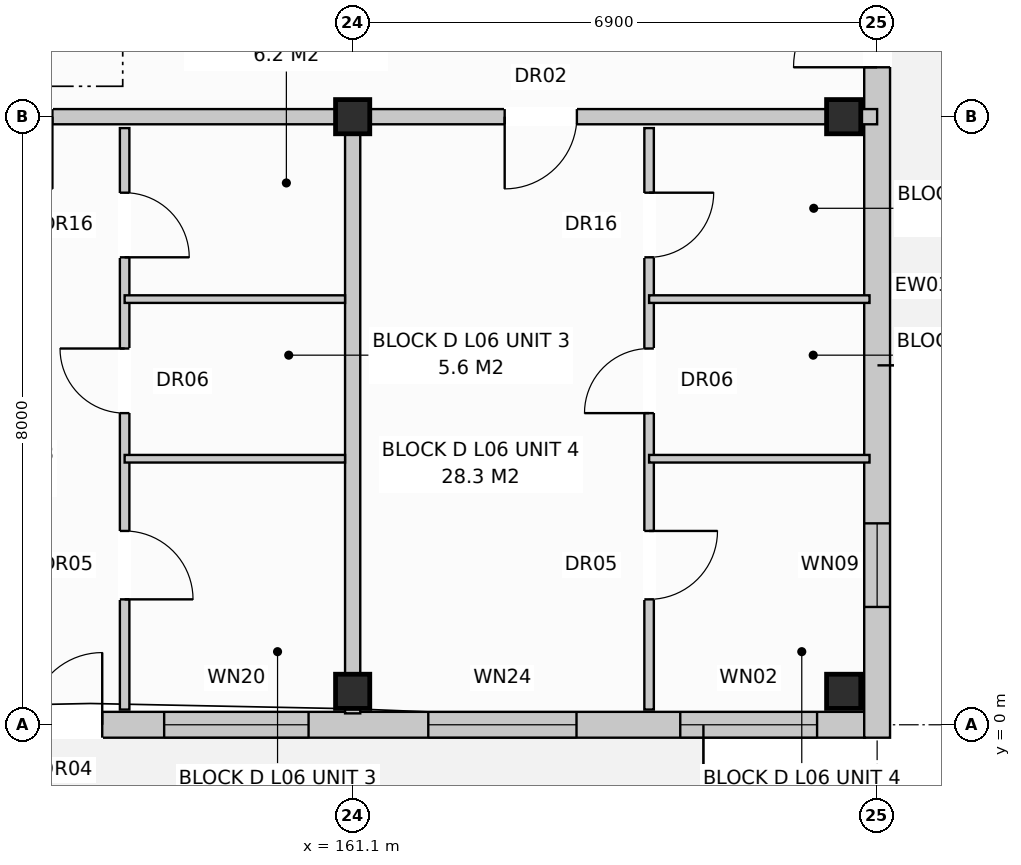
"""IFC4 building model, lengths in metres.
Left out: names, types, materials, properties, quantities, classifications, styles, units other than length and angle.
Written with IfcOpenShell. Run it as: python <this file> out.ifc"""

import sys

from ifc_helpers import new_model, si_unit, direction, frame, frame_2d, origin, origin_with_axes, origin_2d, place, context, subcontext, project, spatial, rectangle, extrude, element, fill, save


model = new_model("IFC4")
c1 = context("Model", 3, precision=1e-05, world=origin(), true_north=direction((0.0, 1.0)))
c2 = subcontext(c1, "Body", "Model", "MODEL_VIEW")
j1 = project(units=[si_unit("LENGTHUNIT", "METRE"), si_unit("PLANEANGLEUNIT", "RADIAN")], contexts=[c1])
p1 = place(None, origin())
s1 = spatial("IfcSite", under=j1, at=p1, CompositionType="ELEMENT")
p2 = place(p1, origin())
s2 = spatial("IfcBuilding", under=s1, at=p2, CompositionType="ELEMENT")
p3 = place(p2, frame((0.0, 0.0, 20.8)))
s3 = spatial("IfcBuildingStorey", under=s2, at=p3, CompositionType="ELEMENT", Elevation=20.8)
for number, where, z_axis, x_axis in (
    (1, (161.1, 0.44, 0.0), (0.0, 0.0, 1.0), (1.0, 0.0, 0.0)),
    (2, (161.1, 8.0, 0.0), (0.0, 0.0, 1.0), (1.0, 0.0, 0.0)),
    (3, (167.56, 0.44, 0.0), (0.0, 0.0, 1.0), (1.0, 0.0, 0.0)),
    (4, (167.56, 8.0, 0.0), (0.0, 0.0, 1.0), (1.0, 0.0, 0.0)),
):
    element("IfcColumn", number, at=place(p3, frame(where, z_axis=z_axis, x_axis=x_axis)), inside=s3, PredefinedType="COLUMN", context=c2, shape_type="SweptSolid", body=[
        extrude(rectangle(XDim=0.45, YDim=0.45, at=origin_2d()), origin(), (0.0, 0.0, 1.0), 3.2),
    ])
p4 = place(p3, frame((126.76, 0.0, 0.0), z_axis=(0.0, 0.0, 1.0), x_axis=(1.0, 0.0, 0.0)))
e5 = element("IfcWall", 5, at=p4, inside=s3, PredefinedType="STANDARD", context=c2, shape_type="SweptSolid", body=[
    extrude(rectangle(XDim=41.08, YDim=0.34, at=frame_2d((20.54, 0.0))), origin(), (0.0, 0.0, 1.0), 2.95),
])
p5 = place(p4, frame((2.795, 0.0, 0.0)))
e6 = element("IfcOpeningElement", 6, at=p5, cuts=e5, PredefinedType="OPENING", context=c2, shape_type="SweptSolid", body=[
    extrude(rectangle(XDim=0.95, YDim=2.1, at=frame_2d((0.475, 1.05))), frame((0.0, 0.182, 0.0), z_axis=(0.0, -1.0, 0.0), x_axis=(1.0, 0.0, 0.0)), (0.0, 0.0, 1.0), 0.364),
])
p6 = place(p4, frame((17.595, 0.0, 0.0)))
e7 = element("IfcOpeningElement", 7, at=p6, cuts=e5, PredefinedType="OPENING", context=c2, shape_type="SweptSolid", body=[
    extrude(rectangle(XDim=0.95, YDim=2.1, at=frame_2d((0.475, 1.05))), frame((0.0, 0.182, 0.0), z_axis=(0.0, -1.0, 0.0), x_axis=(1.0, 0.0, 0.0)), (0.0, 0.0, 1.0), 0.364),
])
p7 = place(p4, frame((30.095, 0.0, 0.0)))
e8 = element("IfcOpeningElement", 8, at=p7, cuts=e5, PredefinedType="OPENING", context=c2, shape_type="SweptSolid", body=[
    extrude(rectangle(XDim=0.95, YDim=2.1, at=frame_2d((0.475, 1.05))), frame((0.0, 0.182, 0.0), z_axis=(0.0, -1.0, 0.0), x_axis=(1.0, 0.0, 0.0)), (0.0, 0.0, 1.0), 0.364),
])
p8 = place(p4, frame((0.63, 0.0, 0.8)))
e9 = element("IfcOpeningElement", 9, at=p8, cuts=e5, PredefinedType="OPENING", context=c2, shape_type="SweptSolid", body=[
    extrude(rectangle(XDim=1.8, YDim=1.7, at=frame_2d((0.9, 0.85))), frame((0.0, 0.182, 0.0), z_axis=(0.0, -1.0, 0.0), x_axis=(1.0, 0.0, 0.0)), (0.0, 0.0, 1.0), 0.364),
])
p9 = place(p4, frame((4.36, 0.0, 0.72)))
e10 = element("IfcOpeningElement", 10, at=p9, cuts=e5, PredefinedType="OPENING", context=c2, shape_type="SweptSolid", body=[
    extrude(rectangle(XDim=1.9, YDim=1.85, at=frame_2d((0.95, 0.925))), frame((0.0, 0.182, 0.0), z_axis=(0.0, -1.0, 0.0), x_axis=(1.0, 0.0, 0.0)), (0.0, 0.0, 1.0), 0.364),
])
p10 = place(p4, frame((10.46, 0.0, 0.72)))
e11 = element("IfcOpeningElement", 11, at=p10, cuts=e5, PredefinedType="OPENING", context=c2, shape_type="SweptSolid", body=[
    extrude(rectangle(XDim=1.1, YDim=1.5, at=frame_2d((0.55, 0.75))), frame((0.0, 0.182, 0.0), z_axis=(0.0, -1.0, 0.0), x_axis=(1.0, 0.0, 0.0)), (0.0, 0.0, 1.0), 0.364),
])
p11 = place(p4, frame((15.76, 0.0, 0.72)))
e12 = element("IfcOpeningElement", 12, at=p11, cuts=e5, PredefinedType="OPENING", context=c2, shape_type="SweptSolid", body=[
    extrude(rectangle(XDim=1.1, YDim=1.5, at=frame_2d((0.55, 0.75))), frame((0.0, 0.182, 0.0), z_axis=(0.0, -1.0, 0.0), x_axis=(1.0, 0.0, 0.0)), (0.0, 0.0, 1.0), 0.364),
])
p12 = place(p4, frame((21.042, 0.0, 0.72)))
e13 = element("IfcOpeningElement", 13, at=p12, cuts=e5, PredefinedType="OPENING", context=c2, shape_type="SweptSolid", body=[
    extrude(rectangle(XDim=1.9, YDim=1.85, at=frame_2d((0.95, 0.925))), frame((0.0, 0.182, 0.0), z_axis=(0.0, -1.0, 0.0), x_axis=(1.0, 0.0, 0.0)), (0.0, 0.0, 1.0), 0.364),
])
p13 = place(p4, frame((24.66, 0.0, 0.72)))
e14 = element("IfcOpeningElement", 14, at=p13, cuts=e5, PredefinedType="OPENING", context=c2, shape_type="SweptSolid", body=[
    extrude(rectangle(XDim=1.1, YDim=1.5, at=frame_2d((0.55, 0.75))), frame((0.0, 0.182, 0.0), z_axis=(0.0, -1.0, 0.0), x_axis=(1.0, 0.0, 0.0)), (0.0, 0.0, 1.0), 0.364),
])
p14 = place(p4, frame((28.21, 0.0, 0.85)))
e15 = element("IfcOpeningElement", 15, at=p14, cuts=e5, PredefinedType="OPENING", context=c2, shape_type="SweptSolid", body=[
    extrude(rectangle(XDim=1.5, YDim=1.65, at=frame_2d((0.75, 0.825))), frame((0.0, 0.182, 0.0), z_axis=(0.0, -1.0, 0.0), x_axis=(1.0, 0.0, 0.0)), (0.0, 0.0, 1.0), 0.364),
])
p15 = place(p4, frame((31.86, 0.0, 0.72)))
e16 = element("IfcOpeningElement", 16, at=p15, cuts=e5, PredefinedType="OPENING", context=c2, shape_type="SweptSolid", body=[
    extrude(rectangle(XDim=1.9, YDim=1.85, at=frame_2d((0.95, 0.925))), frame((0.0, 0.182, 0.0), z_axis=(0.0, -1.0, 0.0), x_axis=(1.0, 0.0, 0.0)), (0.0, 0.0, 1.0), 0.364),
])
p16 = place(p4, frame((35.335, 0.0, 0.8)))
e17 = element("IfcOpeningElement", 17, at=p16, cuts=e5, PredefinedType="OPENING", context=c2, shape_type="SweptSolid", body=[
    extrude(rectangle(XDim=1.95, YDim=1.65, at=frame_2d((0.975, 0.825))), frame((0.0, 0.182, 0.0), z_axis=(0.0, -1.0, 0.0), x_axis=(1.0, 0.0, 0.0)), (0.0, 0.0, 1.0), 0.364),
])
p17 = place(p4, frame((38.65, 0.0, 0.8)))
e18 = element("IfcOpeningElement", 18, at=p17, cuts=e5, PredefinedType="OPENING", context=c2, shape_type="SweptSolid", body=[
    extrude(rectangle(XDim=1.8, YDim=1.7, at=frame_2d((0.9, 0.85))), frame((0.0, 0.182, 0.0), z_axis=(0.0, -1.0, 0.0), x_axis=(1.0, 0.0, 0.0)), (0.0, 0.0, 1.0), 0.364),
])
p18 = place(p3, frame((168.0, -0.17, 0.0), z_axis=(0.0, 0.0, 1.0), x_axis=(0.0, 1.0, 0.0)))
e19 = element("IfcWall", 19, at=p18, inside=s3, PredefinedType="STANDARD", context=c2, shape_type="SweptSolid", body=[
    extrude(rectangle(XDim=18.74, YDim=0.34, at=frame_2d((9.37, 0.0))), origin(), (0.0, 0.0, 1.0), 2.95),
])
p19 = place(p18, frame((8.82, 0.0, 0.0)))
e20 = element("IfcOpeningElement", 20, at=p19, cuts=e19, PredefinedType="OPENING", context=c2, shape_type="SweptSolid", body=[
    extrude(rectangle(XDim=1.1, YDim=2.1, at=frame_2d((0.55, 1.05))), frame((0.0, 0.182, 0.0), z_axis=(0.0, -1.0, 0.0), x_axis=(1.0, 0.0, 0.0)), (0.0, 0.0, 1.0), 0.364),
])
p20 = place(p18, frame((1.72, 0.0, 0.72)))
e21 = element("IfcOpeningElement", 21, at=p20, cuts=e19, PredefinedType="OPENING", context=c2, shape_type="SweptSolid", body=[
    extrude(rectangle(XDim=1.1, YDim=1.5, at=frame_2d((0.55, 0.75))), frame((0.0, 0.182, 0.0), z_axis=(0.0, -1.0, 0.0), x_axis=(1.0, 0.0, 0.0)), (0.0, 0.0, 1.0), 0.364),
])
p21 = place(p18, frame((15.92, 0.0, 0.72)))
e22 = element("IfcOpeningElement", 22, at=p21, cuts=e19, PredefinedType="OPENING", context=c2, shape_type="SweptSolid", body=[
    extrude(rectangle(XDim=1.1, YDim=1.5, at=frame_2d((0.55, 0.75))), frame((0.0, 0.182, 0.0), z_axis=(0.0, -1.0, 0.0), x_axis=(1.0, 0.0, 0.0)), (0.0, 0.0, 1.0), 0.364),
])
p22 = place(p3, frame((161.1, 7.85, 0.0), z_axis=(0.0, 0.0, 1.0), x_axis=(0.0, -1.0, 0.0)))
e23 = element("IfcWall", 23, at=p22, inside=s3, PredefinedType="PARTITIONING", context=c2, shape_type="SweptSolid", body=[
    extrude(rectangle(XDim=7.7, YDim=0.2, at=frame_2d((3.85, 0.0))), origin(), (0.0, 0.0, 1.0), 2.39),
])
p23 = place(p3, frame((154.2, 8.0, 0.0), z_axis=(0.0, 0.0, 1.0), x_axis=(1.0, 0.0, 0.0)))
e24 = element("IfcWall", 24, at=p23, inside=s3, PredefinedType="PARTITIONING", context=c2, shape_type="SweptSolid", body=[
    extrude(rectangle(XDim=6.9, YDim=0.2, at=frame_2d((3.45, 0.0))), origin(), (0.0, 0.0, 1.0), 2.39),
])
p24 = place(p23, frame((2.0, 0.0, 0.0)))
e25 = element("IfcOpeningElement", 25, at=p24, cuts=e24, PredefinedType="OPENING", context=c2, shape_type="SweptSolid", body=[
    extrude(rectangle(XDim=0.95, YDim=2.15, at=frame_2d((0.475, 1.075))), frame((0.0, 0.112, 0.0), z_axis=(0.0, -1.0, 0.0), x_axis=(1.0, 0.0, 0.0)), (0.0, 0.0, 1.0), 0.224),
])
p25 = place(p3, frame((158.1, 7.85, 0.0), z_axis=(0.0, 0.0, 1.0), x_axis=(0.0, -1.0, 0.0)))
e26 = element("IfcWall", 26, at=p25, inside=s3, PredefinedType="PARTITIONING", context=c2, shape_type="SweptSolid", body=[
    extrude(rectangle(XDim=7.65, YDim=0.125, at=frame_2d((3.825, 0.0))), origin(), (0.0, 0.0, 1.0), 2.95),
])
p26 = place(p25, frame((0.85, 0.0, 0.0)))
e27 = element("IfcOpeningElement", 27, at=p26, cuts=e26, PredefinedType="OPENING", context=c2, shape_type="SweptSolid", body=[
    extrude(rectangle(XDim=0.85, YDim=2.1, at=frame_2d((0.425, 1.05))), frame((0.0, 0.074, 0.0), z_axis=(0.0, -1.0, 0.0), x_axis=(1.0, 0.0, 0.0)), (0.0, 0.0, 1.0), 0.149),
])
p27 = place(p25, frame((2.9, 0.0, 0.0)))
e28 = element("IfcOpeningElement", 28, at=p27, cuts=e26, PredefinedType="OPENING", context=c2, shape_type="SweptSolid", body=[
    extrude(rectangle(XDim=0.85, YDim=2.05, at=frame_2d((0.425, 1.025))), frame((0.0, 0.074, 0.0), z_axis=(0.0, -1.0, 0.0), x_axis=(1.0, 0.0, 0.0)), (0.0, 0.0, 1.0), 0.149),
])
p28 = place(p25, frame((5.3, 0.0, 0.0)))
e29 = element("IfcOpeningElement", 29, at=p28, cuts=e26, PredefinedType="OPENING", context=c2, shape_type="SweptSolid", body=[
    extrude(rectangle(XDim=0.9, YDim=2.1, at=frame_2d((0.45, 1.05))), frame((0.0, 0.074, 0.0), z_axis=(0.0, -1.0, 0.0), x_axis=(1.0, 0.0, 0.0)), (0.0, 0.0, 1.0), 0.149),
])
for number, where, z_axis, x_axis in (
    (30, (158.1, 5.6, 0.0), (0.0, 0.0, 1.0), (1.0, 0.0, 0.0)),
    (31, (158.1, 3.5, 0.0), (0.0, 0.0, 1.0), (1.0, 0.0, 0.0)),
):
    element("IfcWall", number, at=place(p3, frame(where, z_axis=z_axis, x_axis=x_axis)), inside=s3, PredefinedType="PARTITIONING", context=c2, shape_type="SweptSolid", body=[
        extrude(rectangle(XDim=2.9, YDim=0.1, at=frame_2d((1.45, 0.0))), origin(), (0.0, 0.0, 1.0), 2.95),
    ])
p29 = place(p3, frame((161.1, 8.0, 0.0), z_axis=(0.0, 0.0, 1.0), x_axis=(1.0, 0.0, 0.0)))
e32 = element("IfcWall", 32, at=p29, inside=s3, PredefinedType="PARTITIONING", context=c2, shape_type="SweptSolid", body=[
    extrude(rectangle(XDim=6.9, YDim=0.2, at=frame_2d((3.45, 0.0))), origin(), (0.0, 0.0, 1.0), 2.39),
])
p30 = place(p29, frame((2.0, 0.0, 0.0)))
e33 = element("IfcOpeningElement", 33, at=p30, cuts=e32, PredefinedType="OPENING", context=c2, shape_type="SweptSolid", body=[
    extrude(rectangle(XDim=0.95, YDim=2.15, at=frame_2d((0.475, 1.075))), frame((0.0, 0.112, 0.0), z_axis=(0.0, -1.0, 0.0), x_axis=(1.0, 0.0, 0.0)), (0.0, 0.0, 1.0), 0.224),
])
p31 = place(p3, frame((165.0, 7.85, 0.0), z_axis=(0.0, 0.0, 1.0), x_axis=(0.0, -1.0, 0.0)))
e34 = element("IfcWall", 34, at=p31, inside=s3, PredefinedType="PARTITIONING", context=c2, shape_type="SweptSolid", body=[
    extrude(rectangle(XDim=7.65, YDim=0.125, at=frame_2d((3.825, 0.0))), origin(), (0.0, 0.0, 1.0), 2.59),
])
p32 = place(p31, frame((0.85, 0.0, 0.0)))
e35 = element("IfcOpeningElement", 35, at=p32, cuts=e34, PredefinedType="OPENING", context=c2, shape_type="SweptSolid", body=[
    extrude(rectangle(XDim=0.85, YDim=2.1, at=frame_2d((0.425, 1.05))), frame((0.0, 0.074, 0.0), z_axis=(0.0, -1.0, 0.0), x_axis=(1.0, 0.0, 0.0)), (0.0, 0.0, 1.0), 0.149),
])
p33 = place(p31, frame((2.9, 0.0, 0.0)))
e36 = element("IfcOpeningElement", 36, at=p33, cuts=e34, PredefinedType="OPENING", context=c2, shape_type="SweptSolid", body=[
    extrude(rectangle(XDim=0.85, YDim=2.05, at=frame_2d((0.425, 1.025))), frame((0.0, 0.074, 0.0), z_axis=(0.0, -1.0, 0.0), x_axis=(1.0, 0.0, 0.0)), (0.0, 0.0, 1.0), 0.149),
])
p34 = place(p31, frame((5.3, 0.0, 0.0)))
e37 = element("IfcOpeningElement", 37, at=p34, cuts=e34, PredefinedType="OPENING", context=c2, shape_type="SweptSolid", body=[
    extrude(rectangle(XDim=0.9, YDim=2.1, at=frame_2d((0.45, 1.05))), frame((0.0, 0.074, 0.0), z_axis=(0.0, -1.0, 0.0), x_axis=(1.0, 0.0, 0.0)), (0.0, 0.0, 1.0), 0.149),
])
for number, where, z_axis, x_axis in (
    (38, (165.0, 5.6, 0.0), (0.0, 0.0, 1.0), (1.0, 0.0, 0.0)),
    (39, (165.0, 3.5, 0.0), (0.0, 0.0, 1.0), (1.0, 0.0, 0.0)),
):
    element("IfcWall", number, at=place(p3, frame(where, z_axis=z_axis, x_axis=x_axis)), inside=s3, PredefinedType="PARTITIONING", context=c2, shape_type="SweptSolid", body=[
        extrude(rectangle(XDim=2.9, YDim=0.1, at=frame_2d((1.45, 0.0))), origin(), (0.0, 0.0, 1.0), 2.95),
    ])
p35 = place(p7, origin_with_axes())
e40 = element("IfcDoor", 40, at=p35, inside=s3, OperationType="SINGLE_SWING_RIGHT", PredefinedType="DOOR", context=c2, shape_type="SweptSolid", body=[
    extrude(rectangle(XDim=0.95, YDim=2.1, at=frame_2d((0.475, 1.05))), frame((0.0, 0.025, 0.0), z_axis=(0.0, -1.0, 0.0), x_axis=(1.0, 0.0, 0.0)), (0.0, 0.0, 1.0), 0.05),
])
fill(e8, e40)
p36 = place(p15, origin_with_axes())
e41 = element("IfcWindow", 41, at=p36, inside=s3, PartitioningType="SINGLE_PANEL", PredefinedType="WINDOW", context=c2, shape_type="SweptSolid", body=[
    extrude(rectangle(XDim=1.9, YDim=1.85, at=frame_2d((0.95, 0.925))), frame((0.0, 0.03, 0.0), z_axis=(0.0, -1.0, 0.0), x_axis=(1.0, 0.0, 0.0)), (0.0, 0.0, 1.0), 0.06),
])
fill(e16, e41)
p37 = place(p16, origin_with_axes())
e42 = element("IfcWindow", 42, at=p37, inside=s3, PartitioningType="SINGLE_PANEL", PredefinedType="WINDOW", context=c2, shape_type="SweptSolid", body=[
    extrude(rectangle(XDim=1.95, YDim=1.65, at=frame_2d((0.975, 0.825))), frame((0.0, 0.03, 0.0), z_axis=(0.0, -1.0, 0.0), x_axis=(1.0, 0.0, 0.0)), (0.0, 0.0, 1.0), 0.06),
])
fill(e17, e42)
p38 = place(p17, origin_with_axes())
e43 = element("IfcWindow", 43, at=p38, inside=s3, PartitioningType="SINGLE_PANEL", PredefinedType="WINDOW", context=c2, shape_type="SweptSolid", body=[
    extrude(rectangle(XDim=1.8, YDim=1.7, at=frame_2d((0.9, 0.85))), frame((0.0, 0.03, 0.0), z_axis=(0.0, -1.0, 0.0), x_axis=(1.0, 0.0, 0.0)), (0.0, 0.0, 1.0), 0.06),
])
fill(e18, e43)
p39 = place(p19, origin_with_axes())
e44 = element("IfcDoor", 44, at=p39, inside=s3, OperationType="SINGLE_SWING_LEFT", PredefinedType="DOOR", context=c2, shape_type="SweptSolid", body=[
    extrude(rectangle(XDim=1.1, YDim=2.1, at=frame_2d((0.55, 1.05))), frame((0.0, 0.025, 0.0), z_axis=(0.0, -1.0, 0.0), x_axis=(1.0, 0.0, 0.0)), (0.0, 0.0, 1.0), 0.05),
])
fill(e20, e44)
p40 = place(p20, origin_with_axes())
e45 = element("IfcWindow", 45, at=p40, inside=s3, PartitioningType="SINGLE_PANEL", PredefinedType="WINDOW", context=c2, shape_type="SweptSolid", body=[
    extrude(rectangle(XDim=1.1, YDim=1.5, at=frame_2d((0.55, 0.75))), frame((0.0, 0.03, 0.0), z_axis=(0.0, -1.0, 0.0), x_axis=(1.0, 0.0, 0.0)), (0.0, 0.0, 1.0), 0.06),
])
fill(e21, e45)
p41 = place(p26, origin_with_axes())
e46 = element("IfcDoor", 46, at=p41, inside=s3, OperationType="SINGLE_SWING_RIGHT", PredefinedType="DOOR", context=c2, shape_type="SweptSolid", body=[
    extrude(rectangle(XDim=0.85, YDim=2.1, at=frame_2d((0.425, 1.05))), frame((0.0, 0.025, 0.0), z_axis=(0.0, -1.0, 0.0), x_axis=(1.0, 0.0, 0.0)), (0.0, 0.0, 1.0), 0.05),
])
fill(e27, e46)
p42 = place(p27, frame((0.85, 0.0, 0.0), z_axis=(0.0, 0.0, 1.0), x_axis=(-1.0, 0.0, 0.0)))
e47 = element("IfcDoor", 47, at=p42, inside=s3, OperationType="SINGLE_SWING_LEFT", PredefinedType="DOOR", context=c2, shape_type="SweptSolid", body=[
    extrude(rectangle(XDim=0.85, YDim=2.05, at=frame_2d((0.425, 1.025))), frame((0.0, 0.025, 0.0), z_axis=(0.0, -1.0, 0.0), x_axis=(1.0, 0.0, 0.0)), (0.0, 0.0, 1.0), 0.05),
])
fill(e28, e47)
p43 = place(p28, origin_with_axes())
e48 = element("IfcDoor", 48, at=p43, inside=s3, OperationType="SINGLE_SWING_RIGHT", PredefinedType="DOOR", context=c2, shape_type="SweptSolid", body=[
    extrude(rectangle(XDim=0.9, YDim=2.1, at=frame_2d((0.45, 1.05))), frame((0.0, 0.025, 0.0), z_axis=(0.0, -1.0, 0.0), x_axis=(1.0, 0.0, 0.0)), (0.0, 0.0, 1.0), 0.05),
])
fill(e29, e48)
p44 = place(p30, frame((0.95, 0.0, 0.0), z_axis=(0.0, 0.0, 1.0), x_axis=(-1.0, 0.0, 0.0)))
e49 = element("IfcDoor", 49, at=p44, inside=s3, OperationType="SINGLE_SWING_LEFT", PredefinedType="DOOR", context=c2, shape_type="SweptSolid", body=[
    extrude(rectangle(XDim=0.95, YDim=2.15, at=frame_2d((0.475, 1.075))), frame((0.0, 0.025, 0.0), z_axis=(0.0, -1.0, 0.0), x_axis=(1.0, 0.0, 0.0)), (0.0, 0.0, 1.0), 0.05),
])
fill(e33, e49)
p45 = place(p32, origin_with_axes())
e50 = element("IfcDoor", 50, at=p45, inside=s3, OperationType="SINGLE_SWING_LEFT", PredefinedType="DOOR", context=c2, shape_type="SweptSolid", body=[
    extrude(rectangle(XDim=0.85, YDim=2.1, at=frame_2d((0.425, 1.05))), frame((0.0, 0.025, 0.0), z_axis=(0.0, -1.0, 0.0), x_axis=(1.0, 0.0, 0.0)), (0.0, 0.0, 1.0), 0.05),
])
fill(e35, e50)
p46 = place(p33, frame((0.85, 0.0, 0.0), z_axis=(0.0, 0.0, 1.0), x_axis=(-1.0, 0.0, 0.0)))
e51 = element("IfcDoor", 51, at=p46, inside=s3, OperationType="SINGLE_SWING_RIGHT", PredefinedType="DOOR", context=c2, shape_type="SweptSolid", body=[
    extrude(rectangle(XDim=0.85, YDim=2.05, at=frame_2d((0.425, 1.025))), frame((0.0, 0.025, 0.0), z_axis=(0.0, -1.0, 0.0), x_axis=(1.0, 0.0, 0.0)), (0.0, 0.0, 1.0), 0.05),
])
fill(e36, e51)
p47 = place(p34, origin_with_axes())
e52 = element("IfcDoor", 52, at=p47, inside=s3, OperationType="SINGLE_SWING_LEFT", PredefinedType="DOOR", context=c2, shape_type="SweptSolid", body=[
    extrude(rectangle(XDim=0.9, YDim=2.1, at=frame_2d((0.45, 1.05))), frame((0.0, 0.025, 0.0), z_axis=(0.0, -1.0, 0.0), x_axis=(1.0, 0.0, 0.0)), (0.0, 0.0, 1.0), 0.05),
])
fill(e37, e52)
save(model, sys.argv[1])
